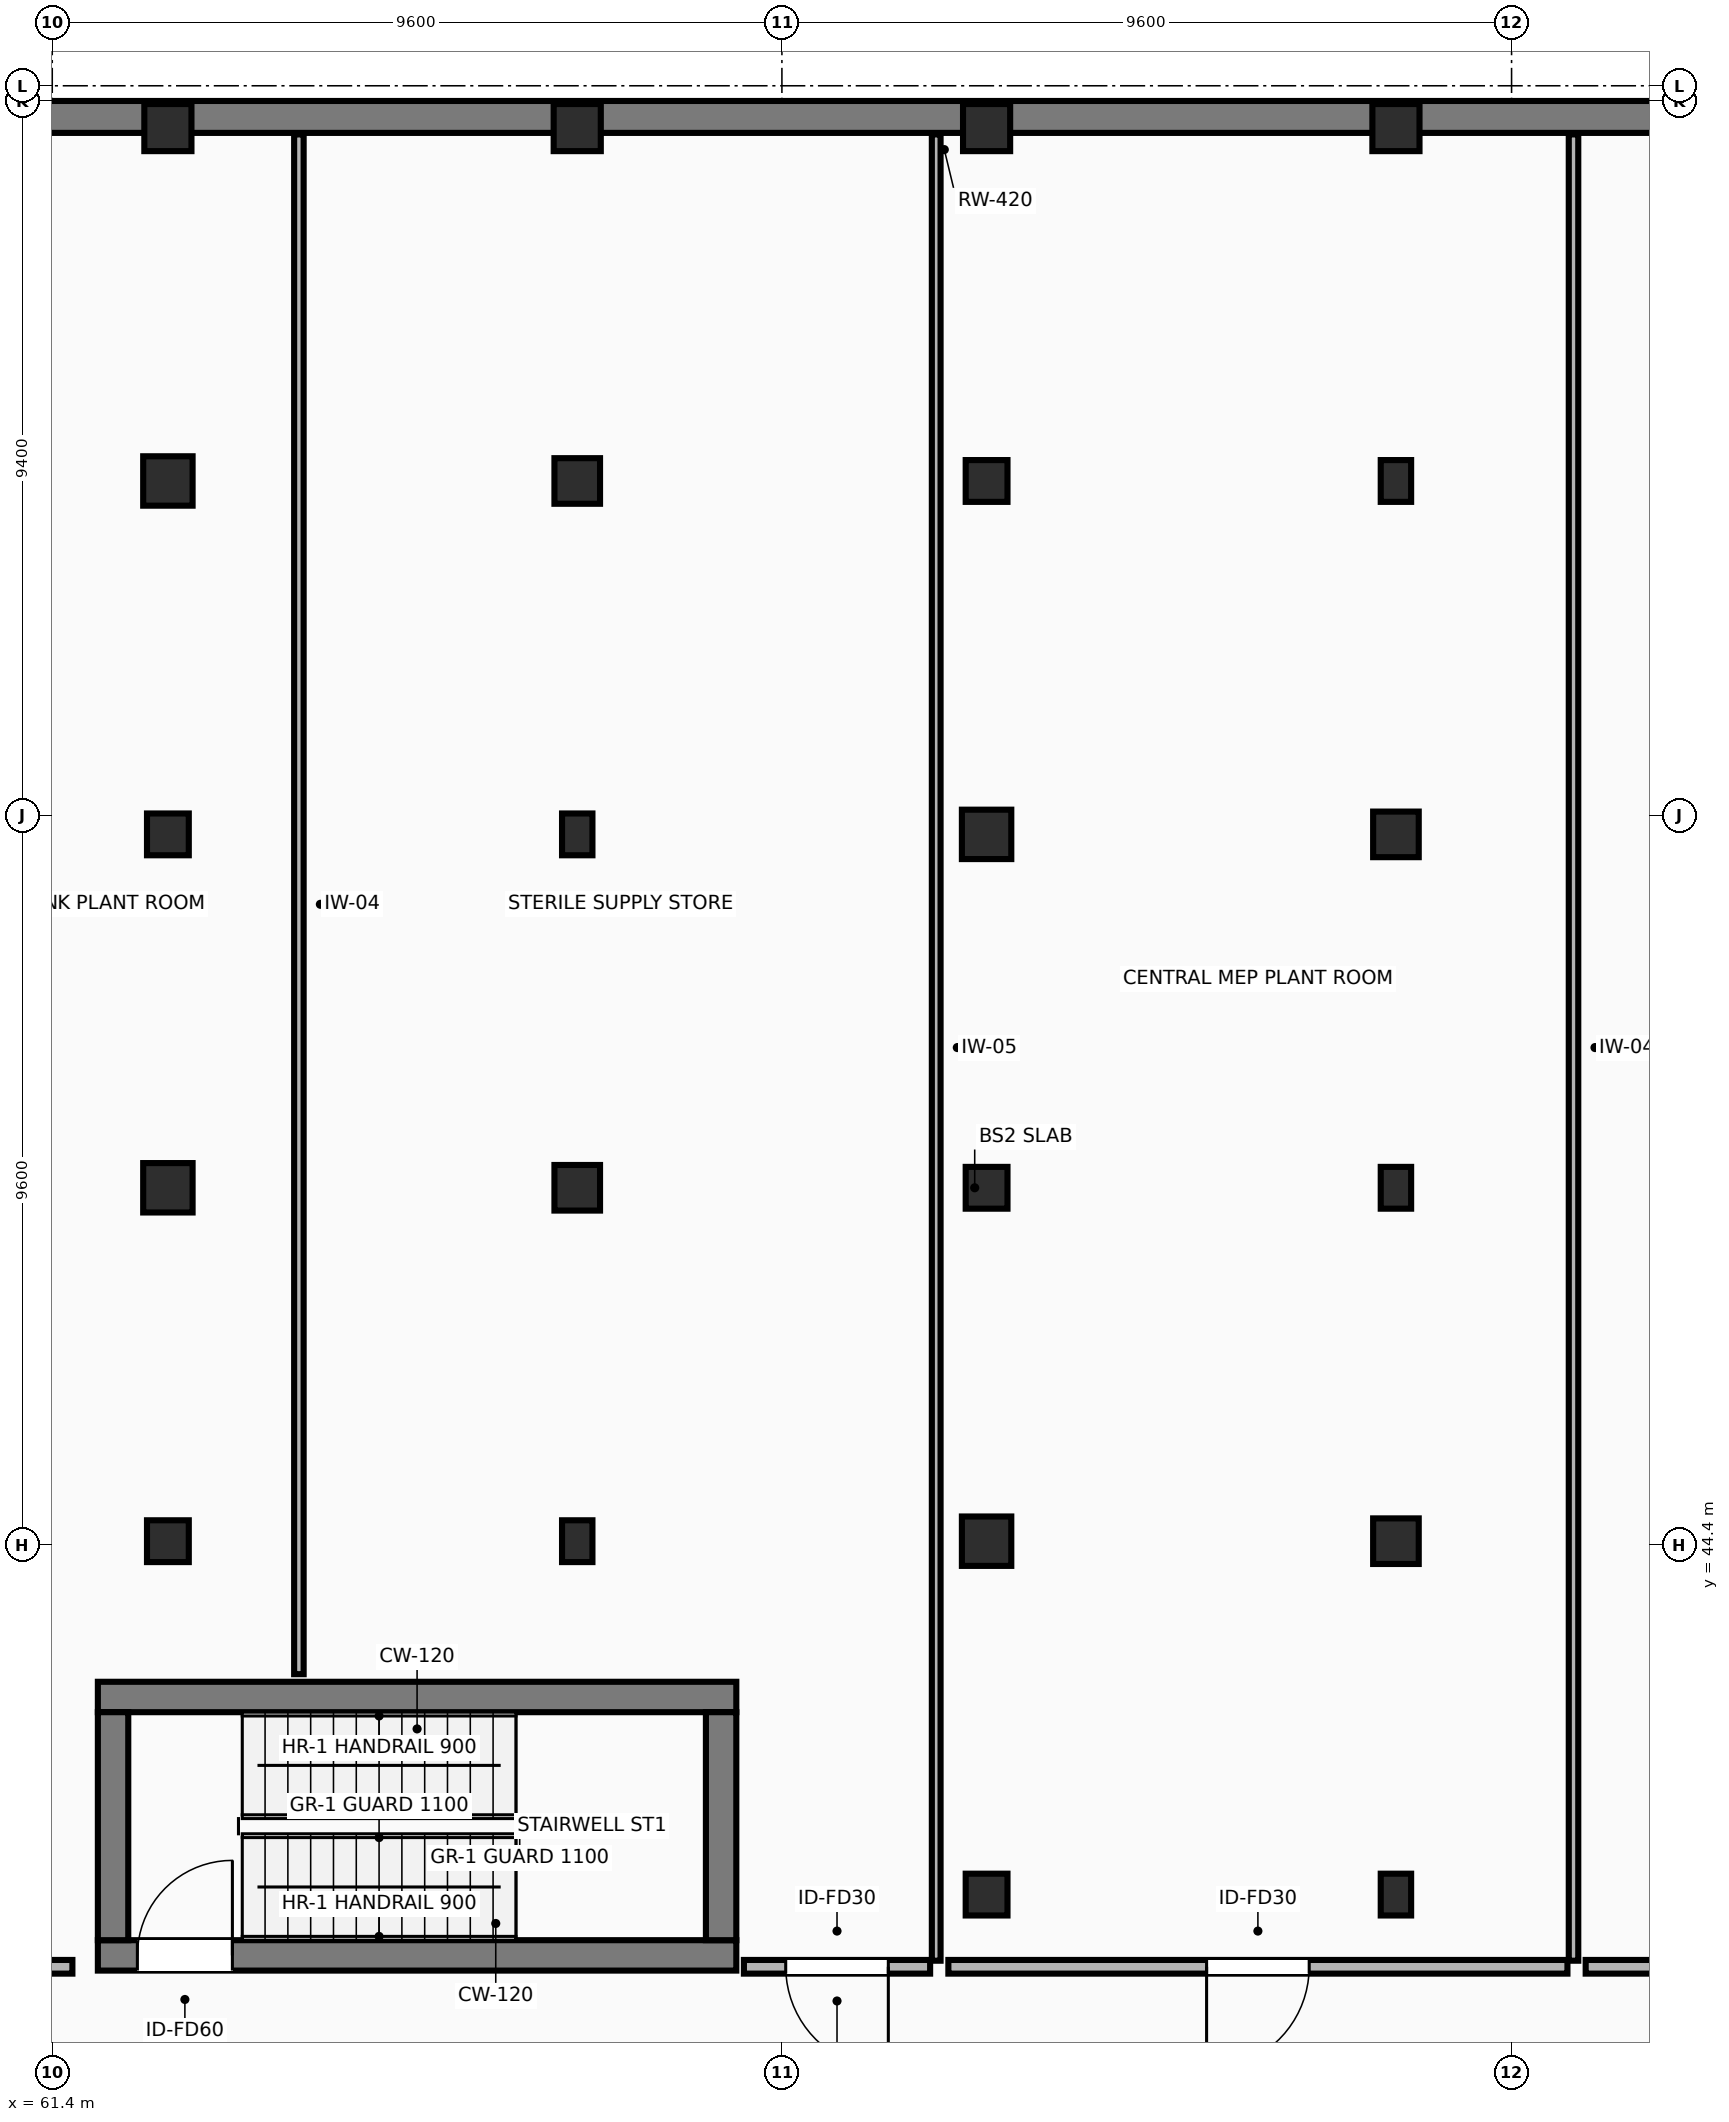
"""IFC4 building model, lengths in metres.
Left out: names, types, materials, properties, quantities, classifications, styles, units other than length and angle.
Written with IfcOpenShell. Run it as: python <this file> out.ifc"""

import sys

from ifc_helpers import new_model, si_unit, direction, frame, frame_2d, origin, origin_2d, place, context, subcontext, project, spatial, rectangle, circle, extrude, element, fill, save


model = new_model("IFC4")
c1 = context("Model", 3, precision=1e-05, world=origin(), true_north=direction((0.0, 1.0)))
c2 = subcontext(c1, "Body", "Model", "MODEL_VIEW")
j1 = project(units=[si_unit("LENGTHUNIT", "METRE"), si_unit("PLANEANGLEUNIT", "RADIAN")], contexts=[c1])
p1 = place(None, origin())
s1 = spatial("IfcSite", under=j1, at=p1, CompositionType="ELEMENT")
p2 = place(p1, origin())
s2 = spatial("IfcBuilding", under=s1, at=p2, CompositionType="ELEMENT")
p3 = place(p2, frame((0.0, 0.0, -4.5)))
s3 = spatial("IfcBuildingStorey", under=s2, at=p3, CompositionType="ELEMENT", Elevation=-4.5)
p4 = place(p3, frame((62.921, 44.45, -0.55), z_axis=(0.0, 0.0, 1.0), x_axis=(1.0, 0.0, 0.0)))
e1 = element("IfcColumn", 1, at=p4, inside=s3, PredefinedType="COLUMN", context=c2, shape_type="SweptSolid", body=[
    extrude(rectangle(XDim=0.55, YDim=0.55, at=origin_2d()), origin(), (0.0, 0.0, 1.0), 5.05),
])
p5 = place(p3, frame((62.921, 49.1, -0.55), z_axis=(0.0, 0.0, 1.0), x_axis=(1.0, 0.0, 0.0)))
e2 = element("IfcColumn", 2, at=p5, inside=s3, PredefinedType="COLUMN", context=c2, shape_type="SweptSolid", body=[
    extrude(rectangle(XDim=0.65, YDim=0.65, at=origin_2d()), origin(), (0.0, 0.0, 1.0), 5.05),
])
p6 = place(p3, frame((62.921, 53.75, -0.55), z_axis=(0.0, 0.0, 1.0), x_axis=(1.0, 0.0, 0.0)))
e3 = element("IfcColumn", 3, at=p6, inside=s3, PredefinedType="COLUMN", context=c2, shape_type="SweptSolid", body=[
    extrude(rectangle(XDim=0.55, YDim=0.55, at=origin_2d()), origin(), (0.0, 0.0, 1.0), 5.05),
])
p7 = place(p3, frame((62.921, 58.4, -0.55), z_axis=(0.0, 0.0, 1.0), x_axis=(1.0, 0.0, 0.0)))
e4 = element("IfcColumn", 4, at=p7, inside=s3, PredefinedType="COLUMN", context=c2, shape_type="SweptSolid", body=[
    extrude(rectangle(XDim=0.65, YDim=0.65, at=origin_2d()), origin(), (0.0, 0.0, 1.0), 5.05),
])
p8 = place(p3, frame((62.921, 63.05, -0.55), z_axis=(0.0, 0.0, 1.0), x_axis=(1.0, 0.0, 0.0)))
e5 = element("IfcColumn", 5, at=p8, inside=s3, PredefinedType="COLUMN", context=c2, shape_type="SweptSolid", body=[
    extrude(circle(Radius=0.31, at=origin_2d()), origin(), (0.0, 0.0, 1.0), 5.05),
])
p9 = place(p3, frame((68.307, 44.45, -0.55), z_axis=(0.0, 0.0, 1.0), x_axis=(1.0, 0.0, 0.0)))
e6 = element("IfcColumn", 6, at=p9, inside=s3, PredefinedType="COLUMN", context=c2, shape_type="SweptSolid", body=[
    extrude(rectangle(XDim=0.4, YDim=0.55, at=origin_2d()), origin(), (0.0, 0.0, 1.0), 5.05),
])
p10 = place(p3, frame((68.307, 49.1, -0.55), z_axis=(0.0, 0.0, 1.0), x_axis=(1.0, 0.0, 0.0)))
e7 = element("IfcColumn", 7, at=p10, inside=s3, PredefinedType="COLUMN", context=c2, shape_type="SweptSolid", body=[
    extrude(rectangle(XDim=0.6, YDim=0.6, at=origin_2d()), origin(), (0.0, 0.0, 1.0), 5.05),
])
p11 = place(p3, frame((68.307, 53.75, -0.55), z_axis=(0.0, 0.0, 1.0), x_axis=(1.0, 0.0, 0.0)))
e8 = element("IfcColumn", 8, at=p11, inside=s3, PredefinedType="COLUMN", context=c2, shape_type="SweptSolid", body=[
    extrude(rectangle(XDim=0.4, YDim=0.55, at=origin_2d()), origin(), (0.0, 0.0, 1.0), 5.05),
])
p12 = place(p3, frame((68.307, 58.4, -0.55), z_axis=(0.0, 0.0, 1.0), x_axis=(1.0, 0.0, 0.0)))
e9 = element("IfcColumn", 9, at=p12, inside=s3, PredefinedType="COLUMN", context=c2, shape_type="SweptSolid", body=[
    extrude(rectangle(XDim=0.6, YDim=0.6, at=origin_2d()), origin(), (0.0, 0.0, 1.0), 5.05),
])
p13 = place(p3, frame((68.307, 63.05, -0.55), z_axis=(0.0, 0.0, 1.0), x_axis=(1.0, 0.0, 0.0)))
e10 = element("IfcColumn", 10, at=p13, inside=s3, PredefinedType="COLUMN", context=c2, shape_type="SweptSolid", body=[
    extrude(circle(Radius=0.31, at=origin_2d()), origin(), (0.0, 0.0, 1.0), 5.05),
])
p14 = place(p3, frame((73.693, 39.8, -0.55), z_axis=(0.0, 0.0, 1.0), x_axis=(1.0, 0.0, 0.0)))
e11 = element("IfcColumn", 11, at=p14, inside=s3, PredefinedType="COLUMN", context=c2, shape_type="SweptSolid", body=[
    extrude(rectangle(XDim=0.55, YDim=0.55, at=origin_2d()), origin(), (0.0, 0.0, 1.0), 5.05),
])
p15 = place(p3, frame((73.693, 44.45, -0.55), z_axis=(0.0, 0.0, 1.0), x_axis=(1.0, 0.0, 0.0)))
e12 = element("IfcColumn", 12, at=p15, inside=s3, PredefinedType="COLUMN", context=c2, shape_type="SweptSolid", body=[
    extrude(rectangle(XDim=0.65, YDim=0.65, at=origin_2d()), origin(), (0.0, 0.0, 1.0), 5.05),
])
p16 = place(p3, frame((73.693, 49.1, -0.55), z_axis=(0.0, 0.0, 1.0), x_axis=(1.0, 0.0, 0.0)))
e13 = element("IfcColumn", 13, at=p16, inside=s3, PredefinedType="COLUMN", context=c2, shape_type="SweptSolid", body=[
    extrude(rectangle(XDim=0.55, YDim=0.55, at=origin_2d()), origin(), (0.0, 0.0, 1.0), 5.05),
])
p17 = place(p3, frame((73.693, 53.75, -0.55), z_axis=(0.0, 0.0, 1.0), x_axis=(1.0, 0.0, 0.0)))
e14 = element("IfcColumn", 14, at=p17, inside=s3, PredefinedType="COLUMN", context=c2, shape_type="SweptSolid", body=[
    extrude(rectangle(XDim=0.65, YDim=0.65, at=origin_2d()), origin(), (0.0, 0.0, 1.0), 5.05),
])
p18 = place(p3, frame((73.693, 58.4, -0.55), z_axis=(0.0, 0.0, 1.0), x_axis=(1.0, 0.0, 0.0)))
e15 = element("IfcColumn", 15, at=p18, inside=s3, PredefinedType="COLUMN", context=c2, shape_type="SweptSolid", body=[
    extrude(rectangle(XDim=0.55, YDim=0.55, at=origin_2d()), origin(), (0.0, 0.0, 1.0), 5.05),
])
p19 = place(p3, frame((73.693, 63.05, -0.55), z_axis=(0.0, 0.0, 1.0), x_axis=(1.0, 0.0, 0.0)))
e16 = element("IfcColumn", 16, at=p19, inside=s3, PredefinedType="COLUMN", context=c2, shape_type="SweptSolid", body=[
    extrude(circle(Radius=0.31, at=origin_2d()), origin(), (0.0, 0.0, 1.0), 5.05),
])
p20 = place(p3, frame((79.079, 39.8, -0.55), z_axis=(0.0, 0.0, 1.0), x_axis=(1.0, 0.0, 0.0)))
e17 = element("IfcColumn", 17, at=p20, inside=s3, PredefinedType="COLUMN", context=c2, shape_type="SweptSolid", body=[
    extrude(rectangle(XDim=0.4, YDim=0.55, at=origin_2d()), origin(), (0.0, 0.0, 1.0), 5.05),
])
p21 = place(p3, frame((79.079, 44.45, -0.55), z_axis=(0.0, 0.0, 1.0), x_axis=(1.0, 0.0, 0.0)))
e18 = element("IfcColumn", 18, at=p21, inside=s3, PredefinedType="COLUMN", context=c2, shape_type="SweptSolid", body=[
    extrude(rectangle(XDim=0.6, YDim=0.6, at=origin_2d()), origin(), (0.0, 0.0, 1.0), 5.05),
])
p22 = place(p3, frame((79.079, 49.1, -0.55), z_axis=(0.0, 0.0, 1.0), x_axis=(1.0, 0.0, 0.0)))
e19 = element("IfcColumn", 19, at=p22, inside=s3, PredefinedType="COLUMN", context=c2, shape_type="SweptSolid", body=[
    extrude(rectangle(XDim=0.4, YDim=0.55, at=origin_2d()), origin(), (0.0, 0.0, 1.0), 5.05),
])
p23 = place(p3, frame((79.079, 53.75, -0.55), z_axis=(0.0, 0.0, 1.0), x_axis=(1.0, 0.0, 0.0)))
e20 = element("IfcColumn", 20, at=p23, inside=s3, PredefinedType="COLUMN", context=c2, shape_type="SweptSolid", body=[
    extrude(rectangle(XDim=0.6, YDim=0.6, at=origin_2d()), origin(), (0.0, 0.0, 1.0), 5.05),
])
p24 = place(p3, frame((79.079, 58.4, -0.55), z_axis=(0.0, 0.0, 1.0), x_axis=(1.0, 0.0, 0.0)))
e21 = element("IfcColumn", 21, at=p24, inside=s3, PredefinedType="COLUMN", context=c2, shape_type="SweptSolid", body=[
    extrude(rectangle(XDim=0.4, YDim=0.55, at=origin_2d()), origin(), (0.0, 0.0, 1.0), 5.05),
])
p25 = place(p3, frame((79.079, 63.05, -0.55), z_axis=(0.0, 0.0, 1.0), x_axis=(1.0, 0.0, 0.0)))
e22 = element("IfcColumn", 22, at=p25, inside=s3, PredefinedType="COLUMN", context=c2, shape_type="SweptSolid", body=[
    extrude(circle(Radius=0.31, at=origin_2d()), origin(), (0.0, 0.0, 1.0), 5.05),
])
p26 = place(p3, frame((90.2, 63.19, 0.0), z_axis=(0.0, 0.0, 1.0), x_axis=(-1.0, 0.0, 0.0)))
e23 = element("IfcWall", 23, at=p26, inside=s3, PredefinedType="SHEAR", context=c2, shape_type="SweptSolid", body=[
    extrude(rectangle(XDim=38.4, YDim=0.42, at=frame_2d((19.2, 0.0))), origin(), (0.0, 0.0, 1.0), 4.18),
])
p27 = place(p3, frame((62.0, 39.0, -0.55), z_axis=(0.0, 0.0, 1.0), x_axis=(1.0, 0.0, 0.0)))
e24 = element("IfcWall", 24, at=p27, inside=s3, PredefinedType="SHEAR", context=c2, shape_type="SweptSolid", body=[
    extrude(rectangle(XDim=8.4, YDim=0.4, at=frame_2d((4.2, 0.0))), origin(), (0.0, 0.0, 1.0), 4.73),
])
p28 = place(p27, frame((0.52, 0.0, 0.55)))
e25 = element("IfcOpeningElement", 25, at=p28, cuts=e24, PredefinedType="OPENING", context=c2, shape_type="SweptSolid", body=[
    extrude(rectangle(XDim=1.25, YDim=2.2, at=frame_2d((0.625, 1.1))), frame((0.0, 0.21, 0.0), z_axis=(0.0, -1.0, 0.0), x_axis=(1.0, 0.0, 0.0)), (0.0, 0.0, 1.0), 0.42),
])
p29 = place(p3, frame((70.4, 42.4, -0.55), z_axis=(0.0, 0.0, 1.0), x_axis=(-1.0, 0.0, 0.0)))
e26 = element("IfcWall", 26, at=p29, inside=s3, PredefinedType="SHEAR", context=c2, shape_type="SweptSolid", body=[
    extrude(rectangle(XDim=8.4, YDim=0.4, at=frame_2d((4.2, 0.0))), origin(), (0.0, 0.0, 1.0), 4.73),
])
for number, where, z_axis, x_axis in (
    (27, (62.2, 39.2, -0.55), (0.0, 0.0, 1.0), (0.0, 1.0, 0.0)),
    (28, (70.2, 42.2, -0.55), (0.0, 0.0, 1.0), (0.0, -1.0, 0.0)),
):
    element("IfcWall", number, at=place(p3, frame(where, z_axis=z_axis, x_axis=x_axis)), inside=s3, PredefinedType="SHEAR", context=c2, shape_type="SweptSolid", body=[
        extrude(rectangle(XDim=3.0, YDim=0.4, at=frame_2d((1.5, 0.0))), origin(), (0.0, 0.0, 1.0), 4.73),
    ])
p30 = place(p3, frame((61.665, 38.85, 0.0), z_axis=(0.0, 0.0, 1.0), x_axis=(-1.0, 0.0, 0.0)))
e29 = element("IfcWall", 29, at=p30, inside=s3, PredefinedType="PARTITIONING", context=c2, shape_type="SweptSolid", body=[
    extrude(rectangle(XDim=5.285, YDim=0.18, at=frame_2d((2.643, 0.0))), origin(), (0.0, 0.0, 1.0), 4.18),
])
p31 = place(p3, frame((64.645, 62.96, 0.0), z_axis=(0.0, 0.0, 1.0), x_axis=(0.0, -1.0, 0.0)))
e30 = element("IfcWall", 30, at=p31, inside=s3, PredefinedType="PARTITIONING", context=c2, shape_type="SweptSolid", body=[
    extrude(rectangle(XDim=20.26, YDim=0.125, at=frame_2d((10.13, 0.0))), origin(), (0.0, 0.0, 1.0), 4.18),
])
p32 = place(p3, frame((73.03, 62.96, 0.0), z_axis=(0.0, 0.0, 1.0), x_axis=(0.0, -1.0, 0.0)))
e31 = element("IfcWall", 31, at=p32, inside=s3, PredefinedType="PARTITIONING", context=c2, shape_type="SweptSolid", body=[
    extrude(rectangle(XDim=24.03, YDim=0.115, at=frame_2d((12.015, 0.0))), origin(), (0.0, 0.0, 1.0), 4.18),
])
p33 = place(p3, frame((72.95, 38.85, 0.0), z_axis=(0.0, 0.0, 1.0), x_axis=(-1.0, 0.0, 0.0)))
e32 = element("IfcWall", 32, at=p33, inside=s3, PredefinedType="PARTITIONING", context=c2, shape_type="SweptSolid", body=[
    extrude(rectangle(XDim=2.45, YDim=0.18, at=frame_2d((1.225, 0.0))), origin(), (0.0, 0.0, 1.0), 4.18),
])
p34 = place(p33, frame((0.55, 0.0, 0.0)))
e33 = element("IfcOpeningElement", 33, at=p34, cuts=e32, PredefinedType="OPENING", context=c2, shape_type="SweptSolid", body=[
    extrude(rectangle(XDim=1.35, YDim=2.2, at=frame_2d((0.675, 1.1))), frame((0.0, 0.1, 0.0), z_axis=(0.0, -1.0, 0.0), x_axis=(1.0, 0.0, 0.0)), (0.0, 0.0, 1.0), 0.2),
])
p35 = place(p3, frame((81.415, 62.96, 0.0), z_axis=(0.0, 0.0, 1.0), x_axis=(0.0, -1.0, 0.0)))
e34 = element("IfcWall", 34, at=p35, inside=s3, PredefinedType="PARTITIONING", context=c2, shape_type="SweptSolid", body=[
    extrude(rectangle(XDim=24.03, YDim=0.125, at=frame_2d((12.015, 0.0))), origin(), (0.0, 0.0, 1.0), 3.848),
])
p36 = place(p3, frame((81.335, 38.85, 0.0), z_axis=(0.0, 0.0, 1.0), x_axis=(-1.0, 0.0, 0.0)))
e35 = element("IfcWall", 35, at=p36, inside=s3, PredefinedType="PARTITIONING", context=c2, shape_type="SweptSolid", body=[
    extrude(rectangle(XDim=8.145, YDim=0.18, at=frame_2d((4.073, 0.0))), origin(), (0.0, 0.0, 1.0), 4.18),
])
p37 = place(p36, frame((3.397, 0.0, 0.0)))
e36 = element("IfcOpeningElement", 36, at=p37, cuts=e35, PredefinedType="OPENING", context=c2, shape_type="SweptSolid", body=[
    extrude(rectangle(XDim=1.35, YDim=2.2, at=frame_2d((0.675, 1.1))), frame((0.0, 0.1, 0.0), z_axis=(0.0, -1.0, 0.0), x_axis=(1.0, 0.0, 0.0)), (0.0, 0.0, 1.0), 0.2),
])
p38 = place(p3, frame((89.76, 38.85, 0.0), z_axis=(0.0, 0.0, 1.0), x_axis=(-1.0, 0.0, 0.0)))
e37 = element("IfcWall", 37, at=p38, inside=s3, PredefinedType="PARTITIONING", context=c2, shape_type="SweptSolid", body=[
    extrude(rectangle(XDim=8.185, YDim=0.18, at=frame_2d((4.093, 0.0))), origin(), (0.0, 0.0, 1.0), 4.18),
])
p39 = place(p38, frame((3.167, 0.0, 0.0)))
e38 = element("IfcOpeningElement", 38, at=p39, cuts=e37, PredefinedType="OPENING", context=c2, shape_type="SweptSolid", body=[
    extrude(rectangle(XDim=1.35, YDim=2.2, at=frame_2d((0.675, 1.1))), frame((0.0, 0.1, 0.0), z_axis=(0.0, -1.0, 0.0), x_axis=(1.0, 0.0, 0.0)), (0.0, 0.0, 1.0), 0.2),
])
p40 = place(p28, origin())
e39 = element("IfcDoor", 39, at=p40, inside=s3, OperationType="SINGLE_SWING_RIGHT", PredefinedType="DOOR", context=c2, shape_type="SweptSolid", body=[
    extrude(rectangle(XDim=1.25, YDim=2.2, at=frame_2d((0.625, 1.1))), frame((0.0, 0.025, 0.0), z_axis=(0.0, -1.0, 0.0), x_axis=(1.0, 0.0, 0.0)), (0.0, 0.0, 1.0), 0.05),
])
fill(e25, e39)
p41 = place(p34, origin())
e40 = element("IfcDoor", 40, at=p41, inside=s3, OperationType="SINGLE_SWING_LEFT", PredefinedType="DOOR", context=c2, shape_type="SweptSolid", body=[
    extrude(rectangle(XDim=1.35, YDim=2.2, at=frame_2d((0.675, 1.1))), frame((0.0, 0.025, 0.0), z_axis=(0.0, -1.0, 0.0), x_axis=(1.0, 0.0, 0.0)), (0.0, 0.0, 1.0), 0.05),
])
fill(e33, e40)
p42 = place(p37, origin())
e41 = element("IfcDoor", 41, at=p42, inside=s3, OperationType="SINGLE_SWING_RIGHT", PredefinedType="DOOR", context=c2, shape_type="SweptSolid", body=[
    extrude(rectangle(XDim=1.35, YDim=2.2, at=frame_2d((0.675, 1.1))), frame((0.0, 0.025, 0.0), z_axis=(0.0, -1.0, 0.0), x_axis=(1.0, 0.0, 0.0)), (0.0, 0.0, 1.0), 0.05),
])
fill(e36, e41)
save(model, sys.argv[1])
